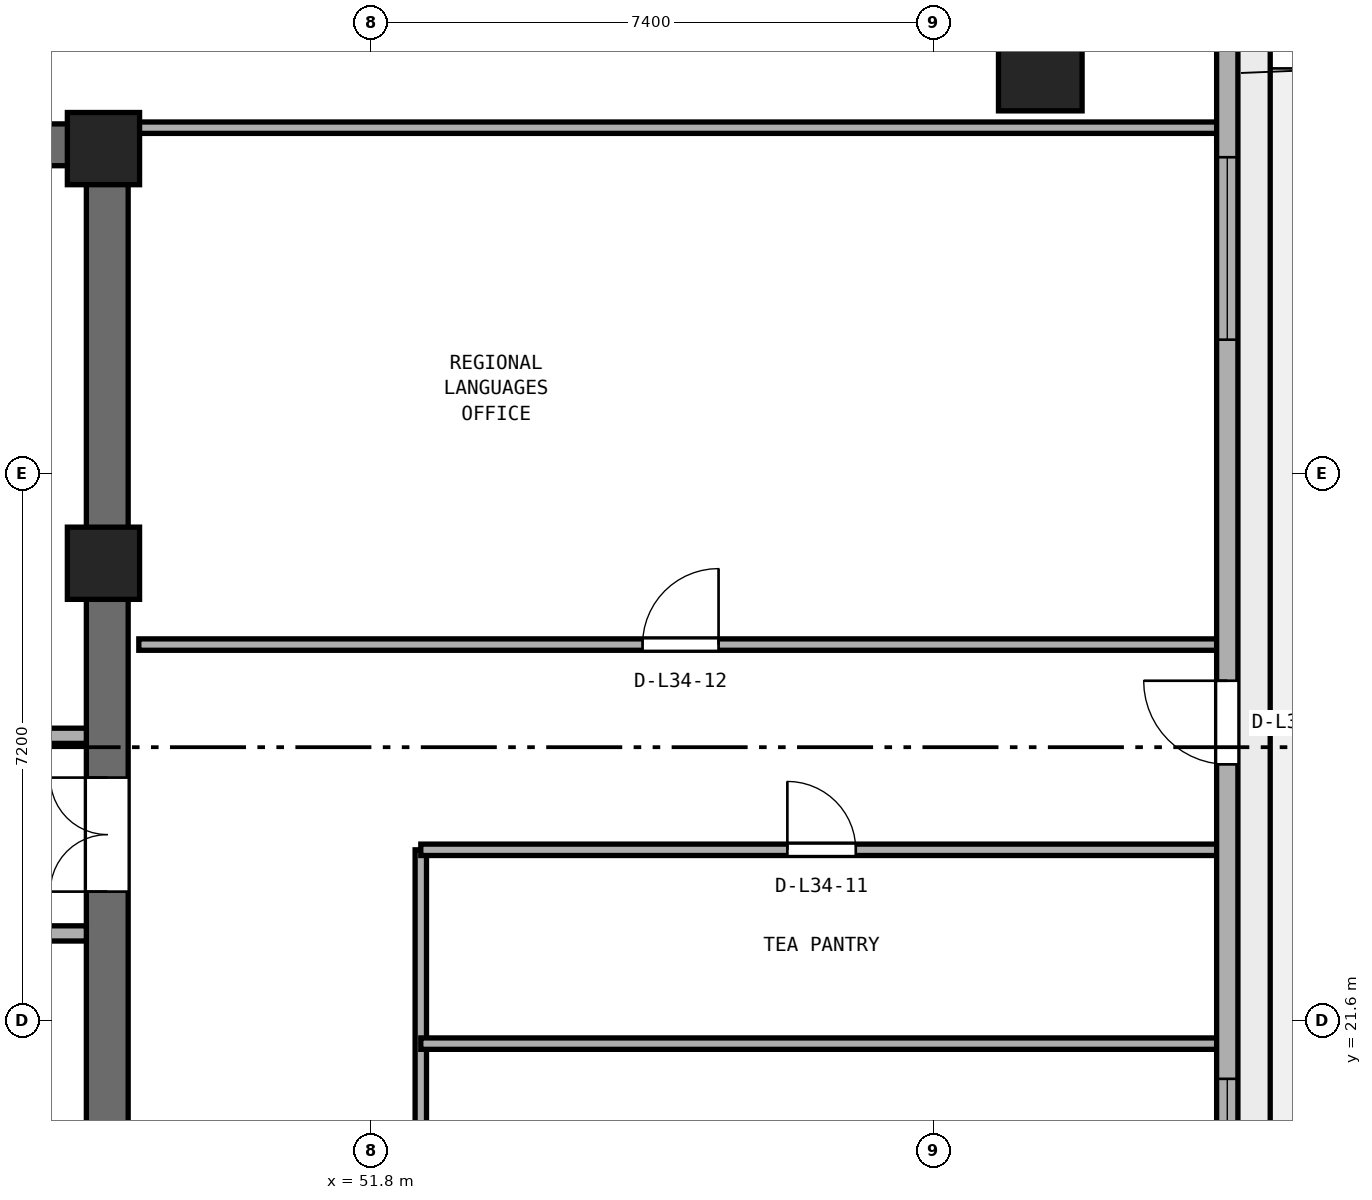
"""IFC4 building model, lengths in metres.
Left out: names, types, materials, properties, quantities, classifications, styles, units other than length and angle.
Written with IfcOpenShell. Run it as: python <this file> out.ifc"""

import sys

from ifc_helpers import new_model, si_unit, direction, frame, frame_2d, origin, origin_2d, place, context, subcontext, project, spatial, rectangle, extrude, element, fill, save


model = new_model("IFC4")
c1 = context("Model", 3, precision=1e-05, world=origin(), true_north=direction((0.0, 1.0)))
c2 = subcontext(c1, "Body", "Model", "MODEL_VIEW")
j1 = project(units=[si_unit("LENGTHUNIT", "METRE"), si_unit("PLANEANGLEUNIT", "RADIAN")], contexts=[c1])
p1 = place(None, origin())
s1 = spatial("IfcSite", under=j1, at=p1, CompositionType="ELEMENT")
p2 = place(p1, origin())
s2 = spatial("IfcBuilding", under=s1, at=p2, CompositionType="ELEMENT")
p3 = place(p2, frame((0.0, 0.0, 136.4)))
s3 = spatial("IfcBuildingStorey", under=s2, at=p3, CompositionType="ELEMENT", Elevation=136.4)
p4 = place(p3, frame((25.4, 33.125, 0.0), z_axis=(0.0, 0.0, 1.0), x_axis=(1.0, 0.0, 0.0)))
e1 = element("IfcWall", 1, at=p4, inside=s3, PredefinedType="SHEAR", context=c2, shape_type="SweptSolid", body=[
    extrude(rectangle(XDim=23.2, YDim=0.55, at=frame_2d((11.6, 0.0))), origin(), (0.0, 0.0, 1.0), 3.54),
])
p5 = place(p3, frame((48.325, 17.55, 0.0), z_axis=(0.0, 0.0, 1.0), x_axis=(0.0, 1.0, 0.0)))
e2 = element("IfcWall", 2, at=p5, inside=s3, PredefinedType="SHEAR", context=c2, shape_type="SweptSolid", body=[
    extrude(rectangle(XDim=15.3, YDim=0.55, at=frame_2d((7.65, 0.0))), origin(), (0.0, 0.0, 1.0), 3.54),
])
p6 = place(p5, frame((5.75, 0.0, 0.0)))
e3 = element("IfcOpeningElement", 3, at=p6, cuts=e2, PredefinedType="OPENING", context=c2, shape_type="SweptSolid", body=[
    extrude(rectangle(XDim=1.5, YDim=2.15, at=frame_2d((0.75, 1.075))), frame((0.0, 0.285, 0.0), z_axis=(0.0, -1.0, 0.0), x_axis=(1.0, 0.0, 0.0)), (0.0, 0.0, 1.0), 0.57),
])
for number, where, z_axis, x_axis in (
    (4, (48.275, 27.62, 0.0), (0.0, 0.0, 1.0), (1.0, 0.0, 0.0)),
    (5, (48.275, 33.075, 0.0), (0.0, 0.0, 1.0), (1.0, 0.0, 0.0)),
):
    element("IfcColumn", number, at=place(p3, frame(where, z_axis=z_axis, x_axis=x_axis)), inside=s3, PredefinedType="PILASTER", context=c2, shape_type="SweptSolid", body=[
        extrude(rectangle(XDim=0.95, YDim=0.95, at=origin_2d()), origin(), (0.0, 0.0, 1.0), 3.8),
    ])
p7 = place(p3, frame((60.6, 34.122, 0.0), z_axis=(0.0, 0.0, 1.0), x_axis=(1.0, 0.0, 0.0)))
e6 = element("IfcColumn", 6, at=p7, inside=s3, PredefinedType="COLUMN", context=c2, shape_type="SweptSolid", body=[
    extrude(rectangle(XDim=1.1, YDim=1.1, at=origin_2d()), origin(), (0.0, 0.0, 1.0), 3.8),
])
p8 = place(p3, frame((42.0, 22.75, 0.0), z_axis=(0.0, 0.0, 1.0), x_axis=(1.0, 0.0, 0.0)))
e7 = element("IfcWall", 7, at=p8, inside=s3, PredefinedType="SOLIDWALL", context=c2, shape_type="SweptSolid", body=[
    extrude(rectangle(XDim=6.05, YDim=0.2, at=frame_2d((3.025, 0.0))), origin(), (0.0, 0.0, 1.0), 3.54),
])
p9 = place(p3, frame((46.1, 25.35, 0.0), z_axis=(0.0, 0.0, 1.0), x_axis=(1.0, 0.0, 0.0)))
e8 = element("IfcWall", 8, at=p9, inside=s3, PredefinedType="SOLIDWALL", context=c2, shape_type="SweptSolid", body=[
    extrude(rectangle(XDim=1.95, YDim=0.2, at=frame_2d((0.975, 0.0))), origin(), (0.0, 0.0, 1.0), 3.54),
])
p10 = place(p3, frame((52.45, 13.15, 0.0), z_axis=(0.0, 0.0, 1.0), x_axis=(0.0, 1.0, 0.0)))
e9 = element("IfcWall", 9, at=p10, inside=s3, PredefinedType="PARTITIONING", context=c2, shape_type="SweptSolid", body=[
    extrude(rectangle(XDim=10.7, YDim=0.15, at=frame_2d((5.35, 0.0))), origin(), (0.0, 0.0, 1.0), 3.54),
])
p11 = place(p10, frame((5.575, 0.0, 0.0)))
e10 = element("IfcOpeningElement", 10, at=p11, cuts=e9, PredefinedType="OPENING", context=c2, shape_type="SweptSolid", body=[
    extrude(rectangle(XDim=0.9, YDim=2.1, at=frame_2d((0.45, 1.05))), frame((0.0, 0.085, 0.0), z_axis=(0.0, -1.0, 0.0), x_axis=(1.0, 0.0, 0.0)), (0.0, 0.0, 1.0), 0.17),
])
p12 = place(p3, frame((52.45, 21.3, 0.0), z_axis=(0.0, 0.0, 1.0), x_axis=(1.0, 0.0, 0.0)))
e11 = element("IfcWall", 11, at=p12, inside=s3, PredefinedType="PARTITIONING", context=c2, shape_type="SweptSolid", body=[
    extrude(rectangle(XDim=10.545, YDim=0.15, at=frame_2d((5.272, 0.0))), origin(), (0.0, 0.0, 1.0), 3.54),
])
p13 = place(p3, frame((52.45, 23.85, 0.0), z_axis=(0.0, 0.0, 1.0), x_axis=(1.0, 0.0, 0.0)))
e12 = element("IfcWall", 12, at=p13, inside=s3, PredefinedType="PARTITIONING", context=c2, shape_type="SweptSolid", body=[
    extrude(rectangle(XDim=10.545, YDim=0.15, at=frame_2d((5.272, 0.0))), origin(), (0.0, 0.0, 1.0), 3.54),
])
p14 = place(p13, frame((4.823, 0.0, 0.0)))
e13 = element("IfcOpeningElement", 13, at=p14, cuts=e12, PredefinedType="OPENING", context=c2, shape_type="SweptSolid", body=[
    extrude(rectangle(XDim=0.9, YDim=2.1, at=frame_2d((0.45, 1.05))), frame((0.0, 0.085, 0.0), z_axis=(0.0, -1.0, 0.0), x_axis=(1.0, 0.0, 0.0)), (0.0, 0.0, 1.0), 0.17),
])
p15 = place(p3, frame((48.74, 26.55, 0.0), z_axis=(0.0, 0.0, 1.0), x_axis=(1.0, 0.0, 0.0)))
e14 = element("IfcWall", 14, at=p15, inside=s3, PredefinedType="PARTITIONING", context=c2, shape_type="SweptSolid", body=[
    extrude(rectangle(XDim=14.255, YDim=0.15, at=frame_2d((7.127, 0.0))), origin(), (0.0, 0.0, 1.0), 3.54),
])
p16 = place(p15, frame((6.627, 0.0, 0.0)))
e15 = element("IfcOpeningElement", 15, at=p16, cuts=e14, PredefinedType="OPENING", context=c2, shape_type="SweptSolid", body=[
    extrude(rectangle(XDim=1.0, YDim=2.12, at=frame_2d((0.5, 1.06))), frame((0.0, 0.085, 0.0), z_axis=(0.0, -1.0, 0.0), x_axis=(1.0, 0.0, 0.0)), (0.0, 0.0, 1.0), 0.17),
])
p17 = place(p3, frame((48.74, 33.35, 0.0), z_axis=(0.0, 0.0, 1.0), x_axis=(1.0, 0.0, 0.0)))
e16 = element("IfcWall", 16, at=p17, inside=s3, PredefinedType="PARTITIONING", context=c2, shape_type="SweptSolid", body=[
    extrude(rectangle(XDim=14.255, YDim=0.15, at=frame_2d((7.127, 0.0))), origin(), (0.0, 0.0, 1.0), 2.923),
])
p18 = place(p3, frame((63.06, 16.418, 0.0), z_axis=(0.0, 0.0, 1.0), x_axis=(0.0, 1.0, 0.0)))
e17 = element("IfcWall", 17, at=p18, inside=s3, PredefinedType="STANDARD", context=c2, shape_type="SweptSolid", body=[
    extrude(rectangle(XDim=18.812, YDim=0.28, at=frame_2d((9.406, 0.0))), origin(), (0.0, 0.0, 1.0), 3.54),
])
p19 = place(p18, frame((8.556, 0.0, 0.0)))
e18 = element("IfcOpeningElement", 18, at=p19, cuts=e17, PredefinedType="OPENING", context=c2, shape_type="SweptSolid", body=[
    extrude(rectangle(XDim=1.1, YDim=2.2, at=frame_2d((0.55, 1.1))), frame((0.0, 0.15, 0.0), z_axis=(0.0, -1.0, 0.0), x_axis=(1.0, 0.0, 0.0)), (0.0, 0.0, 1.0), 0.3),
])
p20 = place(p18, frame((2.019, 0.0, 0.9)))
e19 = element("IfcOpeningElement", 19, at=p20, cuts=e17, PredefinedType="OPENING", context=c2, shape_type="SweptSolid", body=[
    extrude(rectangle(XDim=2.4, YDim=1.75, at=frame_2d((1.2, 0.875))), frame((0.0, 0.15, 0.0), z_axis=(0.0, -1.0, 0.0), x_axis=(1.0, 0.0, 0.0)), (0.0, 0.0, 1.0), 0.3),
])
p21 = place(p18, frame((14.143, 0.0, 0.9)))
e20 = element("IfcOpeningElement", 20, at=p21, cuts=e17, PredefinedType="OPENING", context=c2, shape_type="SweptSolid", body=[
    extrude(rectangle(XDim=2.4, YDim=1.75, at=frame_2d((1.2, 0.875))), frame((0.0, 0.15, 0.0), z_axis=(0.0, -1.0, 0.0), x_axis=(1.0, 0.0, 0.0)), (0.0, 0.0, 1.0), 0.3),
])
p22 = place(p6, origin())
e21 = element("IfcDoor", 21, at=p22, inside=s3, OperationType="DOUBLE_DOOR_SINGLE_SWING", PredefinedType="DOOR", context=c2, shape_type="SweptSolid", body=[
    extrude(rectangle(XDim=1.5, YDim=2.15, at=frame_2d((0.75, 1.075))), frame((0.0, 0.025, 0.0), z_axis=(0.0, -1.0, 0.0), x_axis=(1.0, 0.0, 0.0)), (0.0, 0.0, 1.0), 0.05),
])
fill(e3, e21)
p23 = place(p14, origin())
e22 = element("IfcDoor", 22, at=p23, inside=s3, OperationType="SINGLE_SWING_LEFT", PredefinedType="DOOR", context=c2, shape_type="SweptSolid", body=[
    extrude(rectangle(XDim=0.9, YDim=2.1, at=frame_2d((0.45, 1.05))), frame((0.0, 0.025, 0.0), z_axis=(0.0, -1.0, 0.0), x_axis=(1.0, 0.0, 0.0)), (0.0, 0.0, 1.0), 0.05),
])
fill(e13, e22)
p24 = place(p16, origin())
e23 = element("IfcDoor", 23, at=p24, inside=s3, OperationType="SINGLE_SWING_RIGHT", PredefinedType="DOOR", context=c2, shape_type="SweptSolid", body=[
    extrude(rectangle(XDim=1.0, YDim=2.12, at=frame_2d((0.5, 1.06))), frame((0.0, 0.025, 0.0), z_axis=(0.0, -1.0, 0.0), x_axis=(1.0, 0.0, 0.0)), (0.0, 0.0, 1.0), 0.05),
])
fill(e15, e23)
p25 = place(p19, origin())
e24 = element("IfcDoor", 24, at=p25, inside=s3, OperationType="SINGLE_SWING_RIGHT", PredefinedType="DOOR", context=c2, shape_type="SweptSolid", body=[
    extrude(rectangle(XDim=1.1, YDim=2.2, at=frame_2d((0.55, 1.1))), frame((0.0, 0.025, 0.0), z_axis=(0.0, -1.0, 0.0), x_axis=(1.0, 0.0, 0.0)), (0.0, 0.0, 1.0), 0.05),
])
fill(e18, e24)
p26 = place(p20, origin())
e25 = element("IfcWindow", 25, at=p26, inside=s3, PartitioningType="SINGLE_PANEL", PredefinedType="WINDOW", context=c2, shape_type="SweptSolid", body=[
    extrude(rectangle(XDim=2.4, YDim=1.75, at=frame_2d((1.2, 0.875))), frame((0.0, 0.03, 0.0), z_axis=(0.0, -1.0, 0.0), x_axis=(1.0, 0.0, 0.0)), (0.0, 0.0, 1.0), 0.06),
])
fill(e19, e25)
p27 = place(p21, origin())
e26 = element("IfcWindow", 26, at=p27, inside=s3, PartitioningType="SINGLE_PANEL", PredefinedType="WINDOW", context=c2, shape_type="SweptSolid", body=[
    extrude(rectangle(XDim=2.4, YDim=1.75, at=frame_2d((1.2, 0.875))), frame((0.0, 0.03, 0.0), z_axis=(0.0, -1.0, 0.0), x_axis=(1.0, 0.0, 0.0)), (0.0, 0.0, 1.0), 0.06),
])
fill(e20, e26)
save(model, sys.argv[1])
